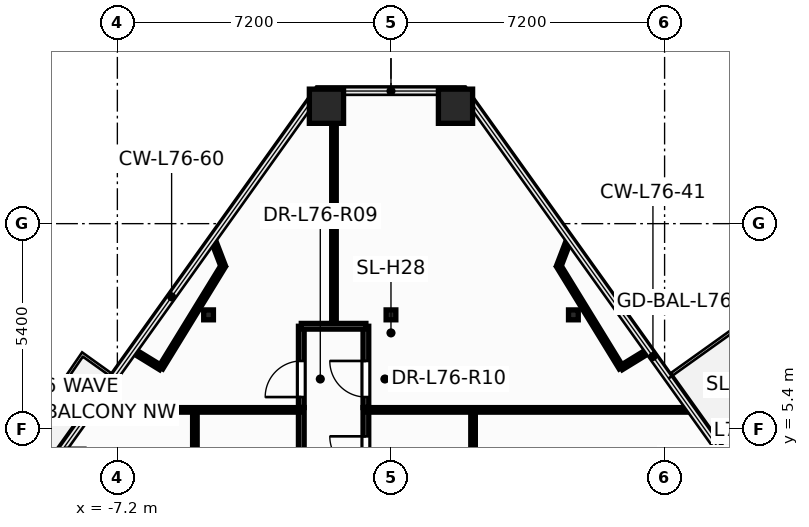
"""IFC4 building model, lengths in metres.
Left out: names, types, materials, properties, quantities, classifications, styles, units other than length and angle.
Written with IfcOpenShell. Run it as: python <this file> out.ifc"""

import sys

from ifc_helpers import new_model, si_unit, direction, frame, frame_2d, origin, origin_2d, place, context, subcontext, project, spatial, rectangle, hollow_rectangle, i_section, extrude, element, fill, save


model = new_model("IFC4")
c1 = context("Model", 3, precision=1e-05, world=origin(), true_north=direction((0.0, 1.0)))
c2 = subcontext(c1, "Body", "Model", "MODEL_VIEW")
j1 = project(units=[si_unit("LENGTHUNIT", "METRE"), si_unit("PLANEANGLEUNIT", "RADIAN")], contexts=[c1])
p1 = place(None, origin())
s1 = spatial("IfcSite", under=j1, at=p1, CompositionType="ELEMENT")
p2 = place(p1, origin())
s2 = spatial("IfcBuilding", under=s1, at=p2, CompositionType="ELEMENT")
p3 = place(p2, frame((0.0, 0.0, 289.2)))
s3 = spatial("IfcBuildingStorey", under=s2, at=p3, CompositionType="ELEMENT", Elevation=289.2)
for number, where, z_axis, x_axis in (
    (1, (1.698, 13.889, 0.0), (0.0, 0.0, 1.0), (1.0, 0.0, 0.0)),
    (2, (-1.698, 13.889, 0.0), (0.0, 0.0, 1.0), (1.0, 0.0, 0.0)),
):
    element("IfcColumn", number, at=place(p3, frame(where, z_axis=z_axis, x_axis=x_axis)), inside=s3, PredefinedType="COLUMN", context=c2, shape_type="SweptSolid", body=[
        extrude(hollow_rectangle(XDim=0.9, YDim=0.9, WallThickness=0.04, at=origin_2d()), origin(), (0.0, 0.0, 1.0), 4.2),
    ])
for number, where, z_axis, x_axis in (
    (3, (-4.8, 8.4, 0.0), (0.0, 0.0, 1.0), (1.0, 0.0, 0.0)),
    (4, (0.0, 8.4, 0.0), (0.0, 0.0, 1.0), (1.0, 0.0, 0.0)),
    (5, (4.8, 8.4, 0.0), (0.0, 0.0, 1.0), (1.0, 0.0, 0.0)),
):
    element("IfcColumn", number, at=place(p3, frame(where, z_axis=z_axis, x_axis=x_axis)), inside=s3, PredefinedType="COLUMN", context=c2, shape_type="SweptSolid", body=[
        extrude(i_section(OverallWidth=0.256, OverallDepth=0.26, WebThickness=0.01, FlangeThickness=0.017, at=origin_2d()), origin(), (0.0, 0.0, 1.0), 4.2),
    ])
p4 = place(p3, frame((-1.5, 8.1, 0.0), z_axis=(0.0, 0.0, 1.0), x_axis=(0.0, 1.0, 0.0)))
e6 = element("IfcWall", 6, at=p4, inside=s3, PredefinedType="PARTITIONING", context=c2, shape_type="SweptSolid", body=[
    extrude(rectangle(XDim=6.189, YDim=0.12, at=frame_2d((3.095, 0.0))), origin(), (0.0, 0.0, 1.0), 2.895),
])
p5 = place(p3, frame((-2.36, -0.2, 0.0), z_axis=(0.0, 0.0, 1.0), x_axis=(0.0, 1.0, 0.0)))
e7 = element("IfcWall", 7, at=p5, inside=s3, PredefinedType="PARTITIONING", context=c2, shape_type="SweptSolid", body=[
    extrude(rectangle(XDim=6.16, YDim=0.15, at=frame_2d((3.08, 0.0))), origin(), (0.0, 0.0, 1.0), 2.895),
])
p6 = place(p5, frame((0.398, 0.0, 0.0)))
e8 = element("IfcOpeningElement", 8, at=p6, cuts=e7, PredefinedType="OPENING", context=c2, shape_type="SweptSolid", body=[
    extrude(rectangle(XDim=0.956, YDim=2.104, at=frame_2d((0.475, 1.052))), frame((0.0, 0.085, 0.0), z_axis=(0.0, -1.0, 0.0), x_axis=(1.0, 0.0, 0.0)), (0.0, 0.0, 1.0), 0.17),
])
p7 = place(p3, frame((-0.66, -0.2, 0.0), z_axis=(0.0, 0.0, 1.0), x_axis=(0.0, 1.0, 0.0)))
e9 = element("IfcWall", 9, at=p7, inside=s3, PredefinedType="PARTITIONING", context=c2, shape_type="SweptSolid", body=[
    extrude(rectangle(XDim=6.16, YDim=0.15, at=frame_2d((3.08, 0.0))), origin(), (0.0, 0.0, 1.0), 2.895),
])
p8 = place(p7, frame((4.454, 0.0, 0.0)))
e10 = element("IfcOpeningElement", 10, at=p8, cuts=e9, PredefinedType="OPENING", context=c2, shape_type="SweptSolid", body=[
    extrude(rectangle(XDim=0.956, YDim=2.104, at=frame_2d((0.475, 1.052))), frame((0.0, 0.085, 0.0), z_axis=(0.0, -1.0, 0.0), x_axis=(1.0, 0.0, 0.0)), (0.0, 0.0, 1.0), 0.17),
])
for number, where, z_axis, x_axis in (
    (11, (-5.16, -0.2, 0.0), (0.0, 0.0, 1.0), (0.0, 1.0, 0.0)),
    (12, (2.16, -0.2, 0.0), (0.0, 0.0, 1.0), (0.0, 1.0, 0.0)),
):
    element("IfcWall", number, at=place(p3, frame(where, z_axis=z_axis, x_axis=x_axis)), inside=s3, PredefinedType="PARTITIONING", context=c2, shape_type="SweptSolid", body=[
        extrude(rectangle(XDim=6.1, YDim=0.12, at=frame_2d((3.05, 0.0))), origin(), (0.0, 0.0, 1.0), 2.895),
    ])
p9 = place(p3, frame((-0.66, 5.9, 0.0), z_axis=(0.0, 0.0, 1.0), x_axis=(1.0, 0.0, 0.0)))
e13 = element("IfcWall", 13, at=p9, inside=s3, PredefinedType="PARTITIONING", context=c2, shape_type="SweptSolid", body=[
    extrude(rectangle(XDim=8.556, YDim=0.12, at=frame_2d((4.278, 0.0))), origin(), (0.0, 0.0, 1.0), 2.895),
])
for number, where, z_axis, x_axis in (
    (14, (-4.416, 9.682, 0.0), (0.0, 0.0, 1.0), (-0.523, -0.852, 0.0)),
    (15, (6.057, 7.009, 0.0), (0.0, 0.0, 1.0), (-0.523, 0.852, 0.0)),
):
    element("IfcWall", number, at=place(p3, frame(where, z_axis=z_axis, x_axis=x_axis)), inside=s3, PredefinedType="PARTITIONING", context=c2, shape_type="SweptSolid", body=[
        extrude(rectangle(XDim=3.137, YDim=0.12, at=frame_2d((1.568, 0.0))), origin(), (0.0, 0.0, 1.0), 2.895),
    ])
p10 = place(p3, frame((-7.896, 5.9, 0.0), z_axis=(0.0, 0.0, 1.0), x_axis=(1.0, 0.0, 0.0)))
e16 = element("IfcWall", 16, at=p10, inside=s3, PredefinedType="PARTITIONING", context=c2, shape_type="SweptSolid", body=[
    extrude(rectangle(XDim=5.536, YDim=0.12, at=frame_2d((2.768, 0.0))), origin(), (0.0, 0.0, 1.0), 2.895),
])
p11 = place(p3, frame((-2.36, 5.962, 0.0), z_axis=(0.0, 0.0, 1.0), x_axis=(0.0, 1.0, 0.0)))
e17 = element("IfcWall", 17, at=p11, inside=s3, PredefinedType="PARTITIONING", context=c2, shape_type="SweptSolid", body=[
    extrude(rectangle(XDim=2.138, YDim=0.15, at=frame_2d((1.069, 0.0))), origin(), (0.0, 0.0, 1.0), 3.54),
])
p12 = place(p11, frame((0.275, 0.0, 0.0)))
e18 = element("IfcOpeningElement", 18, at=p12, cuts=e17, PredefinedType="OPENING", context=c2, shape_type="SweptSolid", body=[
    extrude(rectangle(XDim=0.956, YDim=2.104, at=frame_2d((0.475, 1.052))), frame((0.0, 0.085, 0.0), z_axis=(0.0, -1.0, 0.0), x_axis=(1.0, 0.0, 0.0)), (0.0, 0.0, 1.0), 0.17),
])
p13 = place(p3, frame((-0.66, 5.962, 0.0), z_axis=(0.0, 0.0, 1.0), x_axis=(0.0, 1.0, 0.0)))
e19 = element("IfcWall", 19, at=p13, inside=s3, PredefinedType="PARTITIONING", context=c2, shape_type="SweptSolid", body=[
    extrude(rectangle(XDim=2.138, YDim=0.15, at=frame_2d((1.069, 0.0))), origin(), (0.0, 0.0, 1.0), 3.92),
])
p14 = place(p13, frame((0.275, 0.0, 0.0)))
e20 = element("IfcOpeningElement", 20, at=p14, cuts=e19, PredefinedType="OPENING", context=c2, shape_type="SweptSolid", body=[
    extrude(rectangle(XDim=0.956, YDim=2.104, at=frame_2d((0.475, 1.052))), frame((0.0, 0.085, 0.0), z_axis=(0.0, -1.0, 0.0), x_axis=(1.0, 0.0, 0.0)), (0.0, 0.0, 1.0), 0.17),
])
p15 = place(p3, frame((-2.36, 8.1, 0.0), z_axis=(0.0, 0.0, 1.0), x_axis=(1.0, 0.0, 0.0)))
e21 = element("IfcWall", 21, at=p15, inside=s3, PredefinedType="PARTITIONING", context=c2, shape_type="SweptSolid", body=[
    extrude(rectangle(XDim=1.7, YDim=0.15, at=frame_2d((0.85, 0.0))), origin(), (0.0, 0.0, 1.0), 2.895),
])
for number, where, z_axis, x_axis in (
    (22, (-6.057, 7.009, 0.0), (0.0, 0.0, 1.0), (-0.852, 0.523, 0.0)),
    (23, (6.777, 7.451, 0.0), (0.0, 0.0, 1.0), (-0.852, -0.523, 0.0)),
):
    element("IfcWall", number, at=place(p3, frame(where, z_axis=z_axis, x_axis=x_axis)), inside=s3, PredefinedType="PARTITIONING", context=c2, shape_type="SweptSolid", body=[
        extrude(rectangle(XDim=0.844, YDim=0.12, at=frame_2d((0.422, 0.0))), origin(), (0.0, 0.0, 1.0), 2.895),
    ])
for number, where, z_axis, x_axis in (
    (24, (-4.684, 10.38, 0.0), (0.0, 0.0, 1.0), (0.359, -0.933, 0.0)),
    (25, (4.416, 9.682, 0.0), (0.0, 0.0, 1.0), (0.359, 0.933, 0.0)),
):
    element("IfcWall", number, at=place(p3, frame(where, z_axis=z_axis, x_axis=x_axis)), inside=s3, PredefinedType="PARTITIONING", context=c2, shape_type="SweptSolid", body=[
        extrude(rectangle(XDim=0.748, YDim=0.12, at=frame_2d((0.374, 0.0))), origin(), (0.0, 0.0, 1.0), 3.438),
    ])
p16 = place(p8, origin())
e26 = element("IfcDoor", 26, at=p16, inside=s3, OperationType="SINGLE_SWING_RIGHT", PredefinedType="DOOR", context=c2, shape_type="SweptSolid", body=[
    extrude(rectangle(XDim=0.95, YDim=2.1, at=frame_2d((0.475, 1.05))), frame((0.0, 0.025, 0.0), z_axis=(0.0, -1.0, 0.0), x_axis=(1.0, 0.0, 0.0)), (0.0, 0.0, 1.0), 0.05),
])
fill(e10, e26)
p17 = place(p12, origin())
e27 = element("IfcDoor", 27, at=p17, inside=s3, OperationType="SINGLE_SWING_LEFT", PredefinedType="DOOR", context=c2, shape_type="SweptSolid", body=[
    extrude(rectangle(XDim=0.95, YDim=2.1, at=frame_2d((0.475, 1.05))), frame((0.0, 0.025, 0.0), z_axis=(0.0, -1.0, 0.0), x_axis=(1.0, 0.0, 0.0)), (0.0, 0.0, 1.0), 0.05),
])
fill(e18, e27)
p18 = place(p14, origin())
e28 = element("IfcDoor", 28, at=p18, inside=s3, OperationType="SINGLE_SWING_RIGHT", PredefinedType="DOOR", context=c2, shape_type="SweptSolid", body=[
    extrude(rectangle(XDim=0.95, YDim=2.1, at=frame_2d((0.475, 1.05))), frame((0.0, 0.025, 0.0), z_axis=(0.0, -1.0, 0.0), x_axis=(1.0, 0.0, 0.0)), (0.0, 0.0, 1.0), 0.05),
])
fill(e20, e28)
save(model, sys.argv[1])
